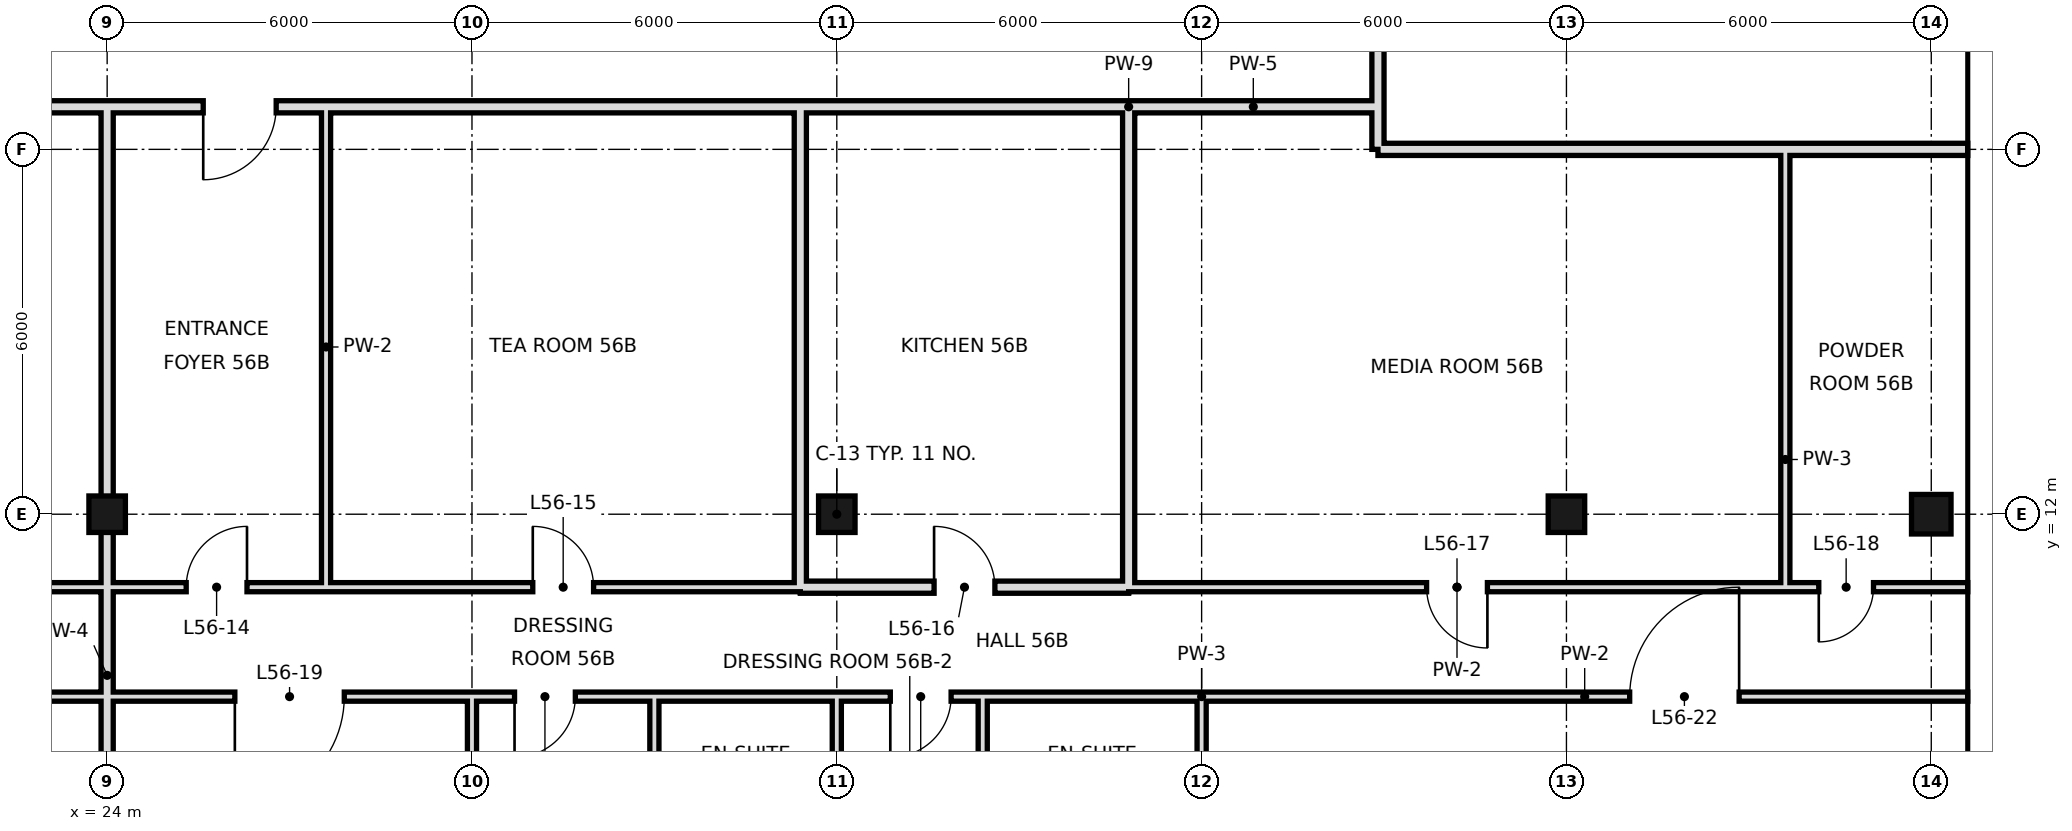
"""IFC4 building model, lengths in metres.
Left out: names, types, materials, properties, quantities, classifications, styles, units other than length and angle.
Written with IfcOpenShell. Run it as: python <this file> out.ifc"""

import sys

from ifc_helpers import new_model, si_unit, direction, frame, frame_2d, origin, origin_2d, place, context, subcontext, project, spatial, rectangle, hollow_rectangle, extrude, element, fill, save


model = new_model("IFC4")
c1 = context("Model", 3, precision=1e-05, world=origin(), true_north=direction((0.0, 1.0)))
c2 = subcontext(c1, "Body", "Model", "MODEL_VIEW")
j1 = project(units=[si_unit("LENGTHUNIT", "METRE"), si_unit("PLANEANGLEUNIT", "RADIAN")], contexts=[c1])
p1 = place(None, origin())
s1 = spatial("IfcSite", under=j1, at=p1, CompositionType="ELEMENT")
p2 = place(p1, origin())
s2 = spatial("IfcBuilding", under=s1, at=p2, CompositionType="ELEMENT")
p3 = place(p2, frame((0.0, 0.0, 239.6)))
s3 = spatial("IfcBuildingStorey", under=s2, at=p3, CompositionType="ELEMENT", Elevation=239.6)
for number, where, z_axis, x_axis in (
    (1, (24.0, 12.0, 0.0), (0.0, 0.0, 1.0), (1.0, 0.0, 0.0)),
    (2, (36.0, 12.0, 0.0), (0.0, 0.0, 1.0), (1.0, 0.0, 0.0)),
    (3, (48.0, 12.0, 0.0), (0.0, 0.0, 1.0), (1.0, 0.0, 0.0)),
):
    element("IfcColumn", number, at=place(p3, frame(where, z_axis=z_axis, x_axis=x_axis)), inside=s3, PredefinedType="COLUMN", context=c2, shape_type="SweptSolid", body=[
        extrude(hollow_rectangle(XDim=0.6, YDim=0.6, WallThickness=0.028, at=origin_2d()), origin(), (0.0, 0.0, 1.0), 3.6),
    ])
p4 = place(p3, frame((54.0, 12.0, 0.0), z_axis=(0.0, 0.0, 1.0), x_axis=(1.0, 0.0, 0.0)))
e4 = element("IfcColumn", 4, at=p4, inside=s3, PredefinedType="COLUMN", context=c2, shape_type="SweptSolid", body=[
    extrude(hollow_rectangle(XDim=0.65, YDim=0.65, WallThickness=0.032, at=origin_2d()), origin(), (0.0, 0.0, 1.0), 3.6),
])
p5 = place(p3, frame((24.0, 0.0, 0.0), z_axis=(0.0, 0.0, 1.0), x_axis=(0.0, 1.0, 0.0)))
e5 = element("IfcWall", 5, at=p5, inside=s3, PredefinedType="SOLIDWALL", context=c2, shape_type="SweptSolid", body=[
    extrude(rectangle(XDim=18.7, YDim=0.2, at=frame_2d((9.35, 0.0))), origin(), (0.0, 0.0, 1.0), 2.72),
])
p6 = place(p3, frame((27.6, 10.8, 0.0), z_axis=(0.0, 0.0, 1.0), x_axis=(0.0, 1.0, 0.0)))
e6 = element("IfcWall", 6, at=p6, inside=s3, PredefinedType="PARTITIONING", context=c2, shape_type="SweptSolid", body=[
    extrude(rectangle(XDim=7.9, YDim=0.15, at=frame_2d((3.95, 0.0))), origin(), (0.0, 0.0, 1.0), 3.42),
])
p7 = place(p3, frame((30.0, -0.6, 0.0), z_axis=(0.0, 0.0, 1.0), x_axis=(0.0, 1.0, 0.0)))
e7 = element("IfcWall", 7, at=p7, inside=s3, PredefinedType="PARTITIONING", context=c2, shape_type="SweptSolid", body=[
    extrude(rectangle(XDim=9.6, YDim=0.15, at=frame_2d((4.8, 0.0))), origin(), (0.0, 0.0, 1.0), 2.72),
])
p8 = place(p3, frame((33.0, 6.0, 0.0), z_axis=(0.0, 0.0, 1.0), x_axis=(0.0, 1.0, 0.0)))
e8 = element("IfcWall", 8, at=p8, inside=s3, PredefinedType="PARTITIONING", context=c2, shape_type="SweptSolid", body=[
    extrude(rectangle(XDim=3.0, YDim=0.15, at=frame_2d((1.5, 0.0))), origin(), (0.0, 0.0, 1.0), 3.42),
])
p9 = place(p3, frame((35.4, 10.8, 0.0), z_axis=(0.0, 0.0, 1.0), x_axis=(0.0, 1.0, 0.0)))
e9 = element("IfcWall", 9, at=p9, inside=s3, PredefinedType="SOLIDWALL", context=c2, shape_type="SweptSolid", body=[
    extrude(rectangle(XDim=7.9, YDim=0.2, at=frame_2d((3.95, 0.0))), origin(), (0.0, 0.0, 1.0), 2.72),
])
p10 = place(p3, frame((36.0, 6.0, 0.0), z_axis=(0.0, 0.0, 1.0), x_axis=(0.0, 1.0, 0.0)))
e10 = element("IfcWall", 10, at=p10, inside=s3, PredefinedType="PARTITIONING", context=c2, shape_type="SweptSolid", body=[
    extrude(rectangle(XDim=3.0, YDim=0.15, at=frame_2d((1.5, 0.0))), origin(), (0.0, 0.0, 1.0), 2.72),
])
p11 = place(p3, frame((38.4, 6.0, 0.0), z_axis=(0.0, 0.0, 1.0), x_axis=(0.0, 1.0, 0.0)))
e11 = element("IfcWall", 11, at=p11, inside=s3, PredefinedType="PARTITIONING", context=c2, shape_type="SweptSolid", body=[
    extrude(rectangle(XDim=3.0, YDim=0.15, at=frame_2d((1.5, 0.0))), origin(), (0.0, 0.0, 1.0), 3.42),
])
p12 = place(p3, frame((40.8, 10.8, 0.0), z_axis=(0.0, 0.0, 1.0), x_axis=(0.0, 1.0, 0.0)))
e12 = element("IfcWall", 12, at=p12, inside=s3, PredefinedType="SOLIDWALL", context=c2, shape_type="SweptSolid", body=[
    extrude(rectangle(XDim=7.9, YDim=0.2, at=frame_2d((3.95, 0.0))), origin(), (0.0, 0.0, 1.0), 2.72),
])
p13 = place(p3, frame((42.0, 6.0, 0.0), z_axis=(0.0, 0.0, 1.0), x_axis=(0.0, 1.0, 0.0)))
e13 = element("IfcWall", 13, at=p13, inside=s3, PredefinedType="PARTITIONING", context=c2, shape_type="SweptSolid", body=[
    extrude(rectangle(XDim=3.0, YDim=0.15, at=frame_2d((1.5, 0.0))), origin(), (0.0, 0.0, 1.0), 2.72),
])
p14 = place(p3, frame((44.9, 18.0, 0.0), z_axis=(0.0, 0.0, 1.0), x_axis=(0.0, 1.0, 0.0)))
e14 = element("IfcWall", 14, at=p14, inside=s3, PredefinedType="SOLIDWALL", context=c2, shape_type="SweptSolid", body=[
    extrude(rectangle(XDim=30.6, YDim=0.2, at=frame_2d((15.3, 0.0))), origin(), (0.0, 0.0, 1.0), 2.72),
])
p15 = place(p14, frame((20.27, 0.0, 0.0)))
e15 = element("IfcOpeningElement", 15, at=p15, cuts=e14, PredefinedType="OPENING", context=c2, shape_type="SweptSolid", body=[
    extrude(rectangle(XDim=1.2, YDim=2.4, at=frame_2d((0.6, 1.2))), frame((0.0, 0.11, 0.0), z_axis=(0.0, -1.0, 0.0), x_axis=(1.0, 0.0, 0.0)), (0.0, 0.0, 1.0), 0.22),
])
p16 = place(p3, frame((51.6, 10.8, 0.0), z_axis=(0.0, 0.0, 1.0), x_axis=(0.0, 1.0, 0.0)))
e16 = element("IfcWall", 16, at=p16, inside=s3, PredefinedType="PARTITIONING", context=c2, shape_type="SweptSolid", body=[
    extrude(rectangle(XDim=7.2, YDim=0.15, at=frame_2d((3.6, 0.0))), origin(), (0.0, 0.0, 1.0), 3.42),
])
p17 = place(p3, frame((35.4, 10.8, 0.0), z_axis=(0.0, 0.0, 1.0), x_axis=(1.0, 0.0, 0.0)))
e17 = element("IfcWall", 17, at=p17, inside=s3, PredefinedType="SOLIDWALL", context=c2, shape_type="SweptSolid", body=[
    extrude(rectangle(XDim=5.4, YDim=0.2, at=frame_2d((2.7, 0.0))), origin(), (0.0, 0.0, 1.0), 2.72),
])
p18 = place(p17, frame((2.2, 0.0, 0.0)))
e18 = element("IfcOpeningElement", 18, at=p18, cuts=e17, PredefinedType="OPENING", context=c2, shape_type="SweptSolid", body=[
    extrude(rectangle(XDim=1.0, YDim=2.4, at=frame_2d((0.5, 1.2))), frame((0.0, 0.11, 0.0), z_axis=(0.0, -1.0, 0.0), x_axis=(1.0, 0.0, 0.0)), (0.0, 0.0, 1.0), 0.22),
])
p19 = place(p3, frame((6.0, 10.8, 0.0), z_axis=(0.0, 0.0, 1.0), x_axis=(1.0, 0.0, 0.0)))
e19 = element("IfcWall", 19, at=p19, inside=s3, PredefinedType="PARTITIONING", context=c2, shape_type="SweptSolid", body=[
    extrude(rectangle(XDim=29.4, YDim=0.15, at=frame_2d((14.7, 0.0))), origin(), (0.0, 0.0, 1.0), 3.42),
])
p20 = place(p19, frame((3.4, 0.0, 0.0)))
e20 = element("IfcOpeningElement", 20, at=p20, cuts=e19, PredefinedType="OPENING", context=c2, shape_type="SweptSolid", body=[
    extrude(rectangle(XDim=1.0, YDim=2.4, at=frame_2d((0.5, 1.2))), frame((0.0, 0.085, 0.0), z_axis=(0.0, -1.0, 0.0), x_axis=(1.0, 0.0, 0.0)), (0.0, 0.0, 1.0), 0.17),
])
p21 = place(p19, frame((9.4, 0.0, 0.0)))
e21 = element("IfcOpeningElement", 21, at=p21, cuts=e19, PredefinedType="OPENING", context=c2, shape_type="SweptSolid", body=[
    extrude(rectangle(XDim=1.0, YDim=2.4, at=frame_2d((0.5, 1.2))), frame((0.0, 0.085, 0.0), z_axis=(0.0, -1.0, 0.0), x_axis=(1.0, 0.0, 0.0)), (0.0, 0.0, 1.0), 0.17),
])
p22 = place(p19, frame((19.3, 0.0, 0.0)))
e22 = element("IfcOpeningElement", 22, at=p22, cuts=e19, PredefinedType="OPENING", context=c2, shape_type="SweptSolid", body=[
    extrude(rectangle(XDim=1.0, YDim=2.4, at=frame_2d((0.5, 1.2))), frame((0.0, 0.085, 0.0), z_axis=(0.0, -1.0, 0.0), x_axis=(1.0, 0.0, 0.0)), (0.0, 0.0, 1.0), 0.17),
])
p23 = place(p19, frame((25.0, 0.0, 0.0)))
e23 = element("IfcOpeningElement", 23, at=p23, cuts=e19, PredefinedType="OPENING", context=c2, shape_type="SweptSolid", body=[
    extrude(rectangle(XDim=1.0, YDim=2.4, at=frame_2d((0.5, 1.2))), frame((0.0, 0.085, 0.0), z_axis=(0.0, -1.0, 0.0), x_axis=(1.0, 0.0, 0.0)), (0.0, 0.0, 1.0), 0.17),
])
p24 = place(p3, frame((40.8, 10.8, 0.0), z_axis=(0.0, 0.0, 1.0), x_axis=(1.0, 0.0, 0.0)))
e24 = element("IfcWall", 24, at=p24, inside=s3, PredefinedType="PARTITIONING", context=c2, shape_type="SweptSolid", body=[
    extrude(rectangle(XDim=10.8, YDim=0.15, at=frame_2d((5.4, 0.0))), origin(), (0.0, 0.0, 1.0), 3.42),
])
p25 = place(p24, frame((4.9, 0.0, 0.0)))
e25 = element("IfcOpeningElement", 25, at=p25, cuts=e24, PredefinedType="OPENING", context=c2, shape_type="SweptSolid", body=[
    extrude(rectangle(XDim=1.0, YDim=2.4, at=frame_2d((0.5, 1.2))), frame((0.0, 0.085, 0.0), z_axis=(0.0, -1.0, 0.0), x_axis=(1.0, 0.0, 0.0)), (0.0, 0.0, 1.0), 0.17),
])
p26 = place(p3, frame((51.6, 10.8, 0.0), z_axis=(0.0, 0.0, 1.0), x_axis=(1.0, 0.0, 0.0)))
e26 = element("IfcWall", 26, at=p26, inside=s3, PredefinedType="PARTITIONING", context=c2, shape_type="SweptSolid", body=[
    extrude(rectangle(XDim=3.0, YDim=0.15, at=frame_2d((1.5, 0.0))), origin(), (0.0, 0.0, 1.0), 3.42),
])
p27 = place(p26, frame((0.55, 0.0, 0.0)))
e27 = element("IfcOpeningElement", 27, at=p27, cuts=e26, PredefinedType="OPENING", context=c2, shape_type="SweptSolid", body=[
    extrude(rectangle(XDim=0.9, YDim=2.4, at=frame_2d((0.45, 1.2))), frame((0.0, 0.085, 0.0), z_axis=(0.0, -1.0, 0.0), x_axis=(1.0, 0.0, 0.0)), (0.0, 0.0, 1.0), 0.17),
])
p28 = place(p3, frame((44.9, 18.0, 0.0), z_axis=(0.0, 0.0, 1.0), x_axis=(1.0, 0.0, 0.0)))
e28 = element("IfcWall", 28, at=p28, inside=s3, PredefinedType="SOLIDWALL", context=c2, shape_type="SweptSolid", body=[
    extrude(rectangle(XDim=9.7, YDim=0.2, at=frame_2d((4.85, 0.0))), origin(), (0.0, 0.0, 1.0), 2.72),
])
p29 = place(p3, frame((6.0, 18.7, 0.0), z_axis=(0.0, 0.0, 1.0), x_axis=(1.0, 0.0, 0.0)))
e29 = element("IfcWall", 29, at=p29, inside=s3, PredefinedType="SOLIDWALL", context=c2, shape_type="SweptSolid", body=[
    extrude(rectangle(XDim=29.4, YDim=0.2, at=frame_2d((14.7, 0.0))), origin(), (0.0, 0.0, 1.0), 2.72),
])
p30 = place(p29, frame((1.54, 0.0, 0.0)))
e30 = element("IfcOpeningElement", 30, at=p30, cuts=e29, PredefinedType="OPENING", context=c2, shape_type="SweptSolid", body=[
    extrude(rectangle(XDim=1.2, YDim=2.4, at=frame_2d((0.6, 1.2))), frame((0.0, 0.11, 0.0), z_axis=(0.0, -1.0, 0.0), x_axis=(1.0, 0.0, 0.0)), (0.0, 0.0, 1.0), 0.22),
])
p31 = place(p29, frame((19.58, 0.0, 0.0)))
e31 = element("IfcOpeningElement", 31, at=p31, cuts=e29, PredefinedType="OPENING", context=c2, shape_type="SweptSolid", body=[
    extrude(rectangle(XDim=1.2, YDim=2.4, at=frame_2d((0.6, 1.2))), frame((0.0, 0.11, 0.0), z_axis=(0.0, -1.0, 0.0), x_axis=(1.0, 0.0, 0.0)), (0.0, 0.0, 1.0), 0.22),
])
p32 = place(p3, frame((40.8, 18.7, 0.0), z_axis=(0.0, 0.0, 1.0), x_axis=(1.0, 0.0, 0.0)))
e32 = element("IfcWall", 32, at=p32, inside=s3, PredefinedType="SOLIDWALL", context=c2, shape_type="SweptSolid", body=[
    extrude(rectangle(XDim=4.1, YDim=0.2, at=frame_2d((2.05, 0.0))), origin(), (0.0, 0.0, 1.0), 2.72),
])
p33 = place(p3, frame((35.4, 18.7, 0.0), z_axis=(0.0, 0.0, 1.0), x_axis=(1.0, 0.0, 0.0)))
e33 = element("IfcWall", 33, at=p33, inside=s3, PredefinedType="SOLIDWALL", context=c2, shape_type="SweptSolid", body=[
    extrude(rectangle(XDim=5.4, YDim=0.2, at=frame_2d((2.7, 0.0))), origin(), (0.0, 0.0, 1.0), 3.42),
])
p34 = place(p3, frame((0.0, 9.0, 0.0), z_axis=(0.0, 0.0, 1.0), x_axis=(1.0, 0.0, 0.0)))
e34 = element("IfcWall", 34, at=p34, inside=s3, PredefinedType="PARTITIONING", context=c2, shape_type="SweptSolid", body=[
    extrude(rectangle(XDim=33.0, YDim=0.15, at=frame_2d((16.5, 0.0))), origin(), (0.0, 0.0, 1.0), 3.42),
])
p35 = place(p34, frame((1.6, 0.0, 0.0)))
e35 = element("IfcOpeningElement", 35, at=p35, cuts=e34, PredefinedType="OPENING", context=c2, shape_type="SweptSolid", body=[
    extrude(rectangle(XDim=1.0, YDim=2.4, at=frame_2d((0.5, 1.2))), frame((0.0, 0.085, 0.0), z_axis=(0.0, -1.0, 0.0), x_axis=(1.0, 0.0, 0.0)), (0.0, 0.0, 1.0), 0.17),
])
p36 = place(p34, frame((9.4, 0.0, 0.0)))
e36 = element("IfcOpeningElement", 36, at=p36, cuts=e34, PredefinedType="OPENING", context=c2, shape_type="SweptSolid", body=[
    extrude(rectangle(XDim=1.0, YDim=2.4, at=frame_2d((0.5, 1.2))), frame((0.0, 0.085, 0.0), z_axis=(0.0, -1.0, 0.0), x_axis=(1.0, 0.0, 0.0)), (0.0, 0.0, 1.0), 0.17),
])
p37 = place(p34, frame((15.16, 0.0, 0.0)))
e37 = element("IfcOpeningElement", 37, at=p37, cuts=e34, PredefinedType="OPENING", context=c2, shape_type="SweptSolid", body=[
    extrude(rectangle(XDim=1.8, YDim=2.4, at=frame_2d((0.9, 1.2))), frame((0.0, 0.085, 0.0), z_axis=(0.0, -1.0, 0.0), x_axis=(1.0, 0.0, 0.0)), (0.0, 0.0, 1.0), 0.17),
])
p38 = place(p34, frame((26.1, 0.0, 0.0)))
e38 = element("IfcOpeningElement", 38, at=p38, cuts=e34, PredefinedType="OPENING", context=c2, shape_type="SweptSolid", body=[
    extrude(rectangle(XDim=1.8, YDim=2.4, at=frame_2d((0.9, 1.2))), frame((0.0, 0.085, 0.0), z_axis=(0.0, -1.0, 0.0), x_axis=(1.0, 0.0, 0.0)), (0.0, 0.0, 1.0), 0.17),
])
p39 = place(p34, frame((30.7, 0.0, 0.0)))
e39 = element("IfcOpeningElement", 39, at=p39, cuts=e34, PredefinedType="OPENING", context=c2, shape_type="SweptSolid", body=[
    extrude(rectangle(XDim=1.0, YDim=2.4, at=frame_2d((0.5, 1.2))), frame((0.0, 0.085, 0.0), z_axis=(0.0, -1.0, 0.0), x_axis=(1.0, 0.0, 0.0)), (0.0, 0.0, 1.0), 0.17),
])
p40 = place(p3, frame((36.0, 9.0, 0.0), z_axis=(0.0, 0.0, 1.0), x_axis=(1.0, 0.0, 0.0)))
e40 = element("IfcWall", 40, at=p40, inside=s3, PredefinedType="PARTITIONING", context=c2, shape_type="SweptSolid", body=[
    extrude(rectangle(XDim=2.4, YDim=0.15, at=frame_2d((1.2, 0.0))), origin(), (0.0, 0.0, 1.0), 3.42),
])
p41 = place(p40, frame((0.88, 0.0, 0.0)))
e41 = element("IfcOpeningElement", 41, at=p41, cuts=e40, PredefinedType="OPENING", context=c2, shape_type="SweptSolid", body=[
    extrude(rectangle(XDim=1.0, YDim=2.4, at=frame_2d((0.5, 1.2))), frame((0.0, 0.085, 0.0), z_axis=(0.0, -1.0, 0.0), x_axis=(1.0, 0.0, 0.0)), (0.0, 0.0, 1.0), 0.17),
])
p42 = place(p3, frame((42.0, 9.0, 0.0), z_axis=(0.0, 0.0, 1.0), x_axis=(1.0, 0.0, 0.0)))
e42 = element("IfcWall", 42, at=p42, inside=s3, PredefinedType="PARTITIONING", context=c2, shape_type="SweptSolid", body=[
    extrude(rectangle(XDim=12.6, YDim=0.15, at=frame_2d((6.3, 0.0))), origin(), (0.0, 0.0, 1.0), 3.42),
])
p43 = place(p42, frame((7.04, 0.0, 0.0)))
e43 = element("IfcOpeningElement", 43, at=p43, cuts=e42, PredefinedType="OPENING", context=c2, shape_type="SweptSolid", body=[
    extrude(rectangle(XDim=1.8, YDim=2.4, at=frame_2d((0.9, 1.2))), frame((0.0, 0.085, 0.0), z_axis=(0.0, -1.0, 0.0), x_axis=(1.0, 0.0, 0.0)), (0.0, 0.0, 1.0), 0.17),
])
p44 = place(p3, frame((33.0, 9.0, 0.0), z_axis=(0.0, 0.0, 1.0), x_axis=(1.0, 0.0, 0.0)))
e44 = element("IfcWall", 44, at=p44, inside=s3, PredefinedType="PARTITIONING", context=c2, shape_type="SweptSolid", body=[
    extrude(rectangle(XDim=3.0, YDim=0.15, at=frame_2d((1.5, 0.0))), origin(), (0.0, 0.0, 1.0), 3.42),
])
p45 = place(p3, frame((38.4, 9.0, 0.0), z_axis=(0.0, 0.0, 1.0), x_axis=(1.0, 0.0, 0.0)))
e45 = element("IfcWall", 45, at=p45, inside=s3, PredefinedType="PARTITIONING", context=c2, shape_type="SweptSolid", body=[
    extrude(rectangle(XDim=3.6, YDim=0.15, at=frame_2d((1.8, 0.0))), origin(), (0.0, 0.0, 1.0), 3.42),
])
p46 = place(p22, frame((1.0, 0.0, 0.0), z_axis=(0.0, 0.0, 1.0), x_axis=(-1.0, 0.0, 0.0)))
e46 = element("IfcDoor", 46, at=p46, inside=s3, OperationType="SINGLE_SWING_LEFT", PredefinedType="DOOR", context=c2, shape_type="SweptSolid", body=[
    extrude(rectangle(XDim=1.0, YDim=2.4, at=frame_2d((0.5, 1.2))), frame((0.0, 0.025, 0.0), z_axis=(0.0, -1.0, 0.0), x_axis=(1.0, 0.0, 0.0)), (0.0, 0.0, 1.0), 0.05),
])
fill(e22, e46)
p47 = place(p23, origin())
e47 = element("IfcDoor", 47, at=p47, inside=s3, OperationType="SINGLE_SWING_LEFT", PredefinedType="DOOR", context=c2, shape_type="SweptSolid", body=[
    extrude(rectangle(XDim=1.0, YDim=2.4, at=frame_2d((0.5, 1.2))), frame((0.0, 0.025, 0.0), z_axis=(0.0, -1.0, 0.0), x_axis=(1.0, 0.0, 0.0)), (0.0, 0.0, 1.0), 0.05),
])
fill(e23, e47)
p48 = place(p18, origin())
e48 = element("IfcDoor", 48, at=p48, inside=s3, OperationType="SINGLE_SWING_LEFT", PredefinedType="DOOR", context=c2, shape_type="SweptSolid", body=[
    extrude(rectangle(XDim=1.0, YDim=2.4, at=frame_2d((0.5, 1.2))), frame((0.0, 0.025, 0.0), z_axis=(0.0, -1.0, 0.0), x_axis=(1.0, 0.0, 0.0)), (0.0, 0.0, 1.0), 0.05),
])
fill(e18, e48)
p49 = place(p25, origin())
e49 = element("IfcDoor", 49, at=p49, inside=s3, OperationType="SINGLE_SWING_RIGHT", PredefinedType="DOOR", context=c2, shape_type="SweptSolid", body=[
    extrude(rectangle(XDim=1.0, YDim=2.4, at=frame_2d((0.5, 1.2))), frame((0.0, 0.025, 0.0), z_axis=(0.0, -1.0, 0.0), x_axis=(1.0, 0.0, 0.0)), (0.0, 0.0, 1.0), 0.05),
])
fill(e25, e49)
p50 = place(p27, frame((0.9, 0.0, 0.0), z_axis=(0.0, 0.0, 1.0), x_axis=(-1.0, 0.0, 0.0)))
e50 = element("IfcDoor", 50, at=p50, inside=s3, OperationType="SINGLE_SWING_RIGHT", PredefinedType="DOOR", context=c2, shape_type="SweptSolid", body=[
    extrude(rectangle(XDim=0.9, YDim=2.4, at=frame_2d((0.45, 1.2))), frame((0.0, 0.025, 0.0), z_axis=(0.0, -1.0, 0.0), x_axis=(1.0, 0.0, 0.0)), (0.0, 0.0, 1.0), 0.05),
])
fill(e27, e50)
p51 = place(p38, frame((1.8, 0.0, 0.0), z_axis=(0.0, 0.0, 1.0), x_axis=(-1.0, 0.0, 0.0)))
e51 = element("IfcDoor", 51, at=p51, inside=s3, OperationType="SINGLE_SWING_RIGHT", PredefinedType="DOOR", context=c2, shape_type="SweptSolid", body=[
    extrude(rectangle(XDim=1.8, YDim=2.4, at=frame_2d((0.9, 1.2))), frame((0.0, 0.025, 0.0), z_axis=(0.0, -1.0, 0.0), x_axis=(1.0, 0.0, 0.0)), (0.0, 0.0, 1.0), 0.05),
])
fill(e38, e51)
p52 = place(p39, frame((1.0, 0.0, 0.0), z_axis=(0.0, 0.0, 1.0), x_axis=(-1.0, 0.0, 0.0)))
e52 = element("IfcDoor", 52, at=p52, inside=s3, OperationType="SINGLE_SWING_RIGHT", PredefinedType="DOOR", context=c2, shape_type="SweptSolid", body=[
    extrude(rectangle(XDim=1.0, YDim=2.4, at=frame_2d((0.5, 1.2))), frame((0.0, 0.025, 0.0), z_axis=(0.0, -1.0, 0.0), x_axis=(1.0, 0.0, 0.0)), (0.0, 0.0, 1.0), 0.05),
])
fill(e39, e52)
p53 = place(p41, frame((1.0, 0.0, 0.0), z_axis=(0.0, 0.0, 1.0), x_axis=(-1.0, 0.0, 0.0)))
e53 = element("IfcDoor", 53, at=p53, inside=s3, OperationType="SINGLE_SWING_RIGHT", PredefinedType="DOOR", context=c2, shape_type="SweptSolid", body=[
    extrude(rectangle(XDim=1.0, YDim=2.4, at=frame_2d((0.5, 1.2))), frame((0.0, 0.025, 0.0), z_axis=(0.0, -1.0, 0.0), x_axis=(1.0, 0.0, 0.0)), (0.0, 0.0, 1.0), 0.05),
])
fill(e41, e53)
p54 = place(p43, frame((1.8, 0.0, 0.0), z_axis=(0.0, 0.0, 1.0), x_axis=(-1.0, 0.0, 0.0)))
e54 = element("IfcDoor", 54, at=p54, inside=s3, OperationType="SINGLE_SWING_LEFT", PredefinedType="DOOR", context=c2, shape_type="SweptSolid", body=[
    extrude(rectangle(XDim=1.8, YDim=2.4, at=frame_2d((0.9, 1.2))), frame((0.0, 0.025, 0.0), z_axis=(0.0, -1.0, 0.0), x_axis=(1.0, 0.0, 0.0)), (0.0, 0.0, 1.0), 0.05),
])
fill(e43, e54)
p55 = place(p31, frame((1.2, 0.0, 0.0), z_axis=(0.0, 0.0, 1.0), x_axis=(-1.0, 0.0, 0.0)))
e55 = element("IfcDoor", 55, at=p55, inside=s3, OperationType="SINGLE_SWING_RIGHT", PredefinedType="DOOR", context=c2, shape_type="SweptSolid", body=[
    extrude(rectangle(XDim=1.2, YDim=2.4, at=frame_2d((0.6, 1.2))), frame((0.0, 0.025, 0.0), z_axis=(0.0, -1.0, 0.0), x_axis=(1.0, 0.0, 0.0)), (0.0, 0.0, 1.0), 0.05),
])
fill(e31, e55)
save(model, sys.argv[1])
